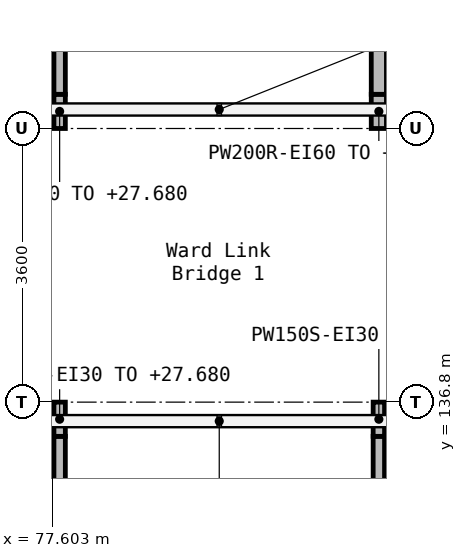
"""IFC4 building model, lengths in metres.
Left out: names, types, materials, properties, quantities, classifications, styles, units other than length and angle.
Written with IfcOpenShell. Run it as: python <this file> out.ifc"""

import sys

from ifc_helpers import new_model, si_unit, direction, frame, frame_2d, origin, place, context, subcontext, project, spatial, rectangle, extrude, element, save


model = new_model("IFC4")
c1 = context("Model", 3, precision=1e-05, world=origin(), true_north=direction((0.0, 1.0)))
c2 = subcontext(c1, "Body", "Model", "MODEL_VIEW")
j1 = project(units=[si_unit("LENGTHUNIT", "METRE"), si_unit("PLANEANGLEUNIT", "RADIAN")], contexts=[c1])
p1 = place(None, origin())
s1 = spatial("IfcSite", under=j1, at=p1, CompositionType="ELEMENT")
p2 = place(p1, origin())
s2 = spatial("IfcBuilding", under=s1, at=p2, CompositionType="ELEMENT")
p3 = place(p2, frame((0.0, 0.0, 24.9)))
s3 = spatial("IfcBuildingStorey", under=s2, at=p3, CompositionType="ELEMENT", Elevation=24.9)
p4 = place(p3, frame((81.9, 140.4, 0.0), z_axis=(0.0, 0.0, 1.0), x_axis=(0.0, 1.0, 0.0)))
e1 = element("IfcWall", 1, at=p4, inside=s3, PredefinedType="SOLIDWALL", context=c2, shape_type="SweptSolid", body=[
    extrude(rectangle(XDim=0.45, YDim=0.2, at=frame_2d((0.225, 0.0))), origin(), (0.0, 0.0, 1.0), 2.78),
])
p5 = place(p3, frame((81.9, 140.85, 0.0), z_axis=(0.0, 0.0, 1.0), x_axis=(0.0, 1.0, 0.0)))
e2 = element("IfcWall", 2, at=p5, inside=s3, PredefinedType="SOLIDWALL", context=c2, shape_type="SweptSolid", body=[
    extrude(rectangle(XDim=7.425, YDim=0.2, at=frame_2d((3.712, 0.0))), origin(), (0.0, 0.0, 1.0), 3.6),
])
p6 = place(p3, frame((77.7, 129.075, 0.0), z_axis=(0.0, 0.0, 1.0), x_axis=(0.0, 1.0, 0.0)))
e3 = element("IfcWall", 3, at=p6, inside=s3, PredefinedType="PARTITIONING", context=c2, shape_type="SweptSolid", body=[
    extrude(rectangle(XDim=7.275, YDim=0.15, at=frame_2d((3.638, 0.0))), origin(), (0.0, 0.0, 1.0), 3.6),
])
p7 = place(p3, frame((77.7, 136.35, 0.0), z_axis=(0.0, 0.0, 1.0), x_axis=(0.0, 1.0, 0.0)))
e4 = element("IfcWall", 4, at=p7, inside=s3, PredefinedType="PARTITIONING", context=c2, shape_type="SweptSolid", body=[
    extrude(rectangle(XDim=0.45, YDim=0.15, at=frame_2d((0.225, 0.0))), origin(), (0.0, 0.0, 1.0), 2.78),
])
p8 = place(p3, frame((81.9, 129.075, 0.0), z_axis=(0.0, 0.0, 1.0), x_axis=(0.0, 1.0, 0.0)))
e5 = element("IfcWall", 5, at=p8, inside=s3, PredefinedType="PARTITIONING", context=c2, shape_type="SweptSolid", body=[
    extrude(rectangle(XDim=7.275, YDim=0.15, at=frame_2d((3.638, 0.0))), origin(), (0.0, 0.0, 1.0), 3.6),
])
p9 = place(p3, frame((81.9, 136.35, 0.0), z_axis=(0.0, 0.0, 1.0), x_axis=(0.0, 1.0, 0.0)))
e6 = element("IfcWall", 6, at=p9, inside=s3, PredefinedType="PARTITIONING", context=c2, shape_type="SweptSolid", body=[
    extrude(rectangle(XDim=0.45, YDim=0.15, at=frame_2d((0.225, 0.0))), origin(), (0.0, 0.0, 1.0), 2.78),
])
p10 = place(p3, frame((77.7, 140.4, 0.0), z_axis=(0.0, 0.0, 1.0), x_axis=(0.0, 1.0, 0.0)))
e7 = element("IfcWall", 7, at=p10, inside=s3, PredefinedType="PARTITIONING", context=c2, shape_type="SweptSolid", body=[
    extrude(rectangle(XDim=0.45, YDim=0.15, at=frame_2d((0.225, 0.0))), origin(), (0.0, 0.0, 1.0), 2.78),
])
p11 = place(p3, frame((77.7, 140.85, 0.0), z_axis=(0.0, 0.0, 1.0), x_axis=(0.0, 1.0, 0.0)))
e8 = element("IfcWall", 8, at=p11, inside=s3, PredefinedType="PARTITIONING", context=c2, shape_type="SweptSolid", body=[
    extrude(rectangle(XDim=7.425, YDim=0.15, at=frame_2d((3.712, 0.0))), origin(), (0.0, 0.0, 1.0), 3.6),
])
save(model, sys.argv[1])
